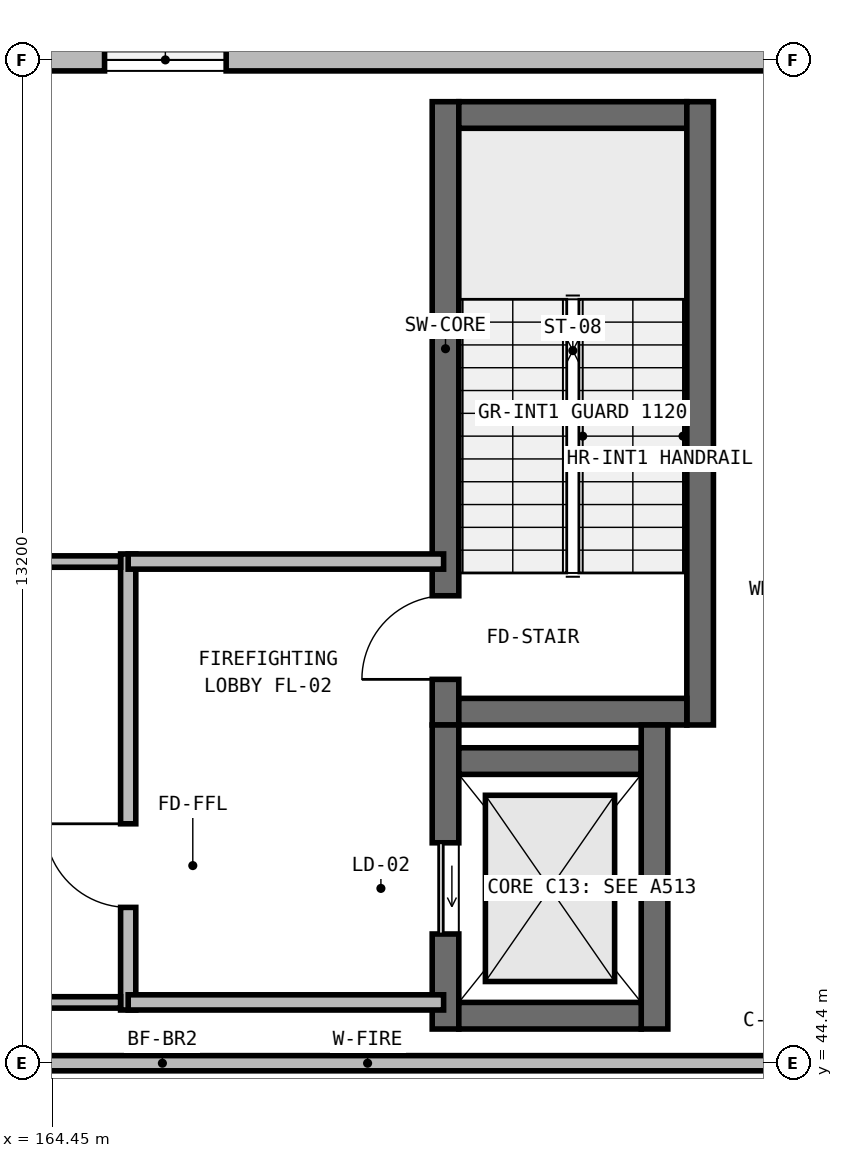
"""IFC4 building model, lengths in metres.
Left out: names, types, materials, properties, quantities, classifications, styles, units other than length and angle.
Written with IfcOpenShell. Run it as: python <this file> out.ifc"""

import sys

from ifc_helpers import new_model, si_unit, direction, frame, frame_2d, origin, place, context, subcontext, project, spatial, rectangle, extrude, element, fill, save


model = new_model("IFC4")
c1 = context("Model", 3, precision=1e-05, world=origin(), true_north=direction((0.0, 1.0)))
c2 = subcontext(c1, "Body", "Model", "MODEL_VIEW")
j1 = project(units=[si_unit("LENGTHUNIT", "METRE"), si_unit("PLANEANGLEUNIT", "RADIAN")], contexts=[c1])
p1 = place(None, origin())
s1 = spatial("IfcSite", under=j1, at=p1, CompositionType="ELEMENT")
p2 = place(p1, origin())
s2 = spatial("IfcBuilding", under=s1, at=p2, CompositionType="ELEMENT")
p3 = place(p2, frame((0.0, 0.0, 37.1)))
s3 = spatial("IfcBuildingStorey", under=s2, at=p3, CompositionType="ELEMENT", Elevation=37.1)
p4 = place(p3, frame((169.625, 48.85, 0.0), z_axis=(0.0, 0.0, 1.0), x_axis=(0.0, 1.0, 0.0)))
e1 = element("IfcWall", 1, at=p4, inside=s3, PredefinedType="SHEAR", context=c2, shape_type="SweptSolid", body=[
    extrude(rectangle(XDim=8.2, YDim=0.35, at=frame_2d((4.1, 0.0))), origin(), (0.0, 0.0, 1.0), 4.55),
])
p5 = place(p4, frame((0.6, 0.0, 0.0)))
e2 = element("IfcOpeningElement", 2, at=p5, cuts=e1, PredefinedType="OPENING", context=c2, shape_type="SweptSolid", body=[
    extrude(rectangle(XDim=1.1, YDim=2.15, at=frame_2d((0.55, 1.075))), frame((0.0, 0.185, 0.0), z_axis=(0.0, -1.0, 0.0), x_axis=(1.0, 0.0, 0.0)), (0.0, 0.0, 1.0), 0.37),
])
p6 = place(p3, frame((169.8, 56.875, 0.0), z_axis=(0.0, 0.0, 1.0), x_axis=(1.0, 0.0, 0.0)))
e3 = element("IfcWall", 3, at=p6, inside=s3, PredefinedType="SHEAR", context=c2, shape_type="SweptSolid", body=[
    extrude(rectangle(XDim=3.0, YDim=0.35, at=frame_2d((1.5, 0.0))), origin(), (0.0, 0.0, 1.0), 4.55),
])
p7 = place(p3, frame((172.975, 57.05, 0.0), z_axis=(0.0, 0.0, 1.0), x_axis=(0.0, -1.0, 0.0)))
e4 = element("IfcWall", 4, at=p7, inside=s3, PredefinedType="SHEAR", context=c2, shape_type="SweptSolid", body=[
    extrude(rectangle(XDim=8.2, YDim=0.35, at=frame_2d((4.1, 0.0))), origin(), (0.0, 0.0, 1.0), 4.55),
])
p8 = place(p3, frame((172.8, 49.025, 0.0), z_axis=(0.0, 0.0, 1.0), x_axis=(-1.0, 0.0, 0.0)))
e5 = element("IfcWall", 5, at=p8, inside=s3, PredefinedType="SHEAR", context=c2, shape_type="SweptSolid", body=[
    extrude(rectangle(XDim=3.0, YDim=0.35, at=frame_2d((1.5, 0.0))), origin(), (0.0, 0.0, 1.0), 4.55),
])
p9 = place(p3, frame((169.625, 44.85, 0.0), z_axis=(0.0, 0.0, 1.0), x_axis=(0.0, 1.0, 0.0)))
e6 = element("IfcWall", 6, at=p9, inside=s3, PredefinedType="SHEAR", context=c2, shape_type="SweptSolid", body=[
    extrude(rectangle(XDim=4.0, YDim=0.35, at=frame_2d((2.0, 0.0))), origin(), (0.0, 0.0, 1.0), 4.55),
])
p10 = place(p9, frame((1.25, 0.0, 0.0)))
e7 = element("IfcOpeningElement", 7, at=p10, cuts=e6, PredefinedType="OPENING", context=c2, shape_type="SweptSolid", body=[
    extrude(rectangle(XDim=1.2, YDim=2.15, at=frame_2d((0.6, 1.075))), frame((0.0, 0.185, 0.0), z_axis=(0.0, -1.0, 0.0), x_axis=(1.0, 0.0, 0.0)), (0.0, 0.0, 1.0), 0.37),
])
p11 = place(p3, frame((169.8, 48.375, 0.0), z_axis=(0.0, 0.0, 1.0), x_axis=(1.0, 0.0, 0.0)))
e8 = element("IfcWall", 8, at=p11, inside=s3, PredefinedType="SHEAR", context=c2, shape_type="SweptSolid", body=[
    extrude(rectangle(XDim=2.4, YDim=0.35, at=frame_2d((1.2, 0.0))), origin(), (0.0, 0.0, 1.0), 4.55),
])
p12 = place(p3, frame((172.375, 48.85, 0.0), z_axis=(0.0, 0.0, 1.0), x_axis=(0.0, -1.0, 0.0)))
e9 = element("IfcWall", 9, at=p12, inside=s3, PredefinedType="SHEAR", context=c2, shape_type="SweptSolid", body=[
    extrude(rectangle(XDim=4.0, YDim=0.35, at=frame_2d((2.0, 0.0))), origin(), (0.0, 0.0, 1.0), 4.55),
])
p13 = place(p3, frame((172.2, 45.025, 0.0), z_axis=(0.0, 0.0, 1.0), x_axis=(-1.0, 0.0, 0.0)))
e10 = element("IfcWall", 10, at=p13, inside=s3, PredefinedType="SHEAR", context=c2, shape_type="SweptSolid", body=[
    extrude(rectangle(XDim=2.4, YDim=0.35, at=frame_2d((1.2, 0.0))), origin(), (0.0, 0.0, 1.0), 4.55),
])
p14 = place(p3, frame((163.204, 57.6, 0.0), z_axis=(0.0, 0.0, 1.0), x_axis=(1.0, 0.0, 0.0)))
e11 = element("IfcWall", 11, at=p14, inside=s3, PredefinedType="SOLIDWALL", context=c2, shape_type="SweptSolid", body=[
    extrude(rectangle(XDim=10.941, YDim=0.29, at=frame_2d((5.47, 0.0))), origin(), (0.0, 0.0, 1.0), 3.747),
])
p15 = place(p14, frame((1.935, 0.0, 0.95)))
e12 = element("IfcOpeningElement", 12, at=p15, cuts=e11, PredefinedType="OPENING", context=c2, shape_type="SweptSolid", body=[
    extrude(rectangle(XDim=1.6, YDim=1.72, at=frame_2d((0.8, 0.86))), frame((0.0, 0.155, 0.0), z_axis=(0.0, -1.0, 0.0), x_axis=(1.0, 0.0, 0.0)), (0.0, 0.0, 1.0), 0.31),
])
p16 = place(p3, frame((163.36, 44.4, 0.0), z_axis=(0.0, 0.0, 1.0), x_axis=(1.0, 0.0, 0.0)))
e13 = element("IfcWall", 13, at=p16, inside=s3, PredefinedType="SOLIDWALL", context=c2, shape_type="SweptSolid", body=[
    extrude(rectangle(XDim=10.48, YDim=0.2, at=frame_2d((5.24, 0.0))), origin(), (0.0, 0.0, 1.0), 3.752),
])
p17 = place(p3, frame((165.45, 45.1, 0.0), z_axis=(0.0, 0.0, 1.0), x_axis=(0.0, 1.0, 0.0)))
e14 = element("IfcWall", 14, at=p17, inside=s3, PredefinedType="SOLIDWALL", context=c2, shape_type="SweptSolid", body=[
    extrude(rectangle(XDim=6.0, YDim=0.2, at=frame_2d((3.0, 0.0))), origin(), (0.0, 0.0, 1.0), 4.3),
])
p18 = place(p17, frame((1.35, 0.0, 0.0)))
e15 = element("IfcOpeningElement", 15, at=p18, cuts=e14, PredefinedType="OPENING", context=c2, shape_type="SweptSolid", body=[
    extrude(rectangle(XDim=1.1, YDim=2.15, at=frame_2d((0.55, 1.075))), frame((0.0, 0.11, 0.0), z_axis=(0.0, -1.0, 0.0), x_axis=(1.0, 0.0, 0.0)), (0.0, 0.0, 1.0), 0.22),
])
for number, where, z_axis, x_axis in (
    (16, (165.45, 45.2, 0.0), (0.0, 0.0, 1.0), (1.0, 0.0, 0.0)),
    (17, (165.45, 51.0, 0.0), (0.0, 0.0, 1.0), (1.0, 0.0, 0.0)),
):
    element("IfcWall", number, at=place(p3, frame(where, z_axis=z_axis, x_axis=x_axis)), inside=s3, PredefinedType="SOLIDWALL", context=c2, shape_type="SweptSolid", body=[
        extrude(rectangle(XDim=4.15, YDim=0.2, at=frame_2d((2.075, 0.0))), origin(), (0.0, 0.0, 1.0), 4.3),
    ])
for number, where, z_axis, x_axis in (
    (18, (162.78, 45.2, 0.0), (0.0, 0.0, 1.0), (1.0, 0.0, 0.0)),
    (19, (162.78, 51.0, 0.0), (0.0, 0.0, 1.0), (1.0, 0.0, 0.0)),
):
    element("IfcWall", number, at=place(p3, frame(where, z_axis=z_axis, x_axis=x_axis)), inside=s3, PredefinedType="PARTITIONING", context=c2, shape_type="SweptSolid", body=[
        extrude(rectangle(XDim=2.57, YDim=0.15, at=frame_2d((1.285, 0.0))), origin(), (0.0, 0.0, 1.0), 4.3),
    ])
p19 = place(p15, origin())
e20 = element("IfcWindow", 20, at=p19, inside=s3, PartitioningType="SINGLE_PANEL", PredefinedType="WINDOW", context=c2, shape_type="SweptSolid", body=[
    extrude(rectangle(XDim=1.6, YDim=1.72, at=frame_2d((0.8, 0.86))), frame((0.0, 0.03, 0.0), z_axis=(0.0, -1.0, 0.0), x_axis=(1.0, 0.0, 0.0)), (0.0, 0.0, 1.0), 0.06),
])
fill(e12, e20)
p20 = place(p5, origin())
e21 = element("IfcDoor", 21, at=p20, inside=s3, OperationType="SINGLE_SWING_LEFT", PredefinedType="DOOR", context=c2, shape_type="SweptSolid", body=[
    extrude(rectangle(XDim=1.1, YDim=2.15, at=frame_2d((0.55, 1.075))), frame((0.0, 0.025, 0.0), z_axis=(0.0, -1.0, 0.0), x_axis=(1.0, 0.0, 0.0)), (0.0, 0.0, 1.0), 0.05),
])
fill(e2, e21)
p21 = place(p10, origin())
e22 = element("IfcDoor", 22, at=p21, inside=s3, OperationType="SLIDING_TO_LEFT", PredefinedType="USERDEFINED", context=c2, shape_type="SweptSolid", body=[
    extrude(rectangle(XDim=1.2, YDim=2.15, at=frame_2d((0.6, 1.075))), frame((0.0, 0.025, 0.0), z_axis=(0.0, -1.0, 0.0), x_axis=(1.0, 0.0, 0.0)), (0.0, 0.0, 1.0), 0.05),
])
fill(e7, e22)
p22 = place(p18, origin())
e23 = element("IfcDoor", 23, at=p22, inside=s3, OperationType="SINGLE_SWING_RIGHT", PredefinedType="DOOR", context=c2, shape_type="SweptSolid", body=[
    extrude(rectangle(XDim=1.1, YDim=2.15, at=frame_2d((0.55, 1.075))), frame((0.0, 0.025, 0.0), z_axis=(0.0, -1.0, 0.0), x_axis=(1.0, 0.0, 0.0)), (0.0, 0.0, 1.0), 0.05),
])
fill(e15, e23)
save(model, sys.argv[1])
